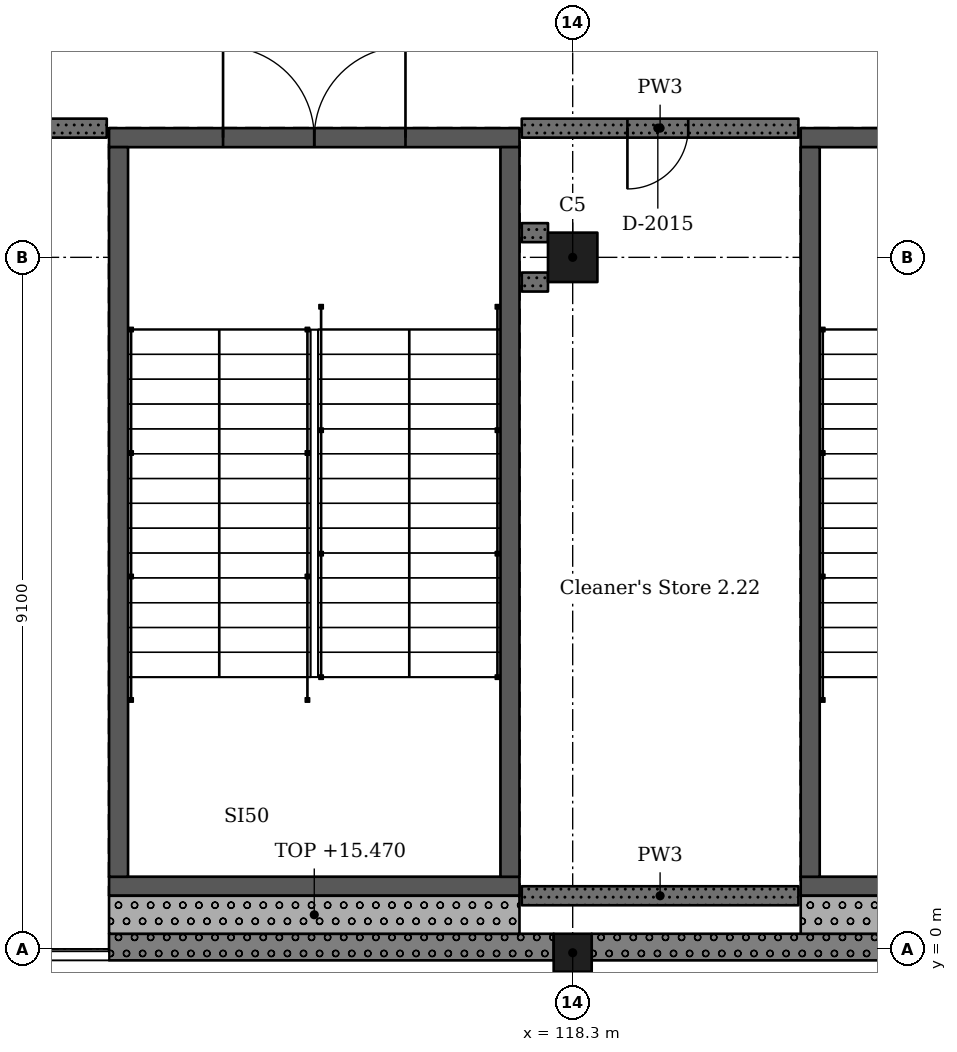
"""IFC4 building model, lengths in metres.
Left out: names, types, materials, properties, quantities, classifications, styles, units other than length and angle.
Written with IfcOpenShell. Run it as: python <this file> out.ifc"""

import sys

from ifc_helpers import new_model, si_unit, direction, frame, frame_2d, origin, origin_2d, place, context, subcontext, project, spatial, rectangle, extrude, element, fill, save


model = new_model("IFC4")
c1 = context("Model", 3, precision=1e-05, world=origin(), true_north=direction((0.0, 1.0)))
c2 = subcontext(c1, "Body", "Model", "MODEL_VIEW")
j1 = project(units=[si_unit("LENGTHUNIT", "METRE"), si_unit("PLANEANGLEUNIT", "RADIAN")], contexts=[c1])
p1 = place(None, origin())
s1 = spatial("IfcSite", under=j1, at=p1, CompositionType="ELEMENT")
p2 = place(p1, origin())
s2 = spatial("IfcBuilding", under=s1, at=p2, CompositionType="ELEMENT")
p3 = place(p2, frame((0.0, 0.0, 10.92)))
s3 = spatial("IfcBuildingStorey", under=s2, at=p3, CompositionType="ELEMENT", Elevation=10.92)
p4 = place(p3, frame((118.3, -0.05, 0.0), z_axis=(0.0, 0.0, 1.0), x_axis=(1.0, 0.0, 0.0)))
e1 = element("IfcColumn", 1, at=p4, inside=s3, PredefinedType="COLUMN", context=c2, shape_type="SweptSolid", body=[
    extrude(rectangle(XDim=0.5, YDim=0.5, at=origin_2d()), origin(), (0.0, 0.0, 1.0), 4.55),
])
p5 = place(p3, frame((118.3, 9.1, 0.0), z_axis=(0.0, 0.0, 1.0), x_axis=(1.0, 0.0, 0.0)))
e2 = element("IfcColumn", 2, at=p5, inside=s3, PredefinedType="COLUMN", context=c2, shape_type="SweptSolid", body=[
    extrude(rectangle(XDim=0.65, YDim=0.65, at=origin_2d()), origin(), (0.0, 0.0, 1.0), 4.55),
])
p6 = place(p3, frame((126.7, 0.825, 0.0), z_axis=(0.0, 0.0, 1.0), x_axis=(-1.0, 0.0, 0.0)))
e3 = element("IfcWall", 3, at=p6, inside=s3, PredefinedType="SHEAR", context=c2, shape_type="SweptSolid", body=[
    extrude(rectangle(XDim=5.4, YDim=0.25, at=frame_2d((2.7, 0.0))), origin(), (0.0, 0.0, 1.0), 4.55),
])
p7 = place(p3, frame((126.7, 10.675, 0.0), z_axis=(0.0, 0.0, 1.0), x_axis=(-1.0, 0.0, 0.0)))
e4 = element("IfcWall", 4, at=p7, inside=s3, PredefinedType="SHEAR", context=c2, shape_type="SweptSolid", body=[
    extrude(rectangle(XDim=5.4, YDim=0.25, at=frame_2d((2.7, 0.0))), origin(), (0.0, 0.0, 1.0), 4.55),
])
p8 = place(p7, frame((1.5, 0.0, 0.0)))
e5 = element("IfcOpeningElement", 5, at=p8, cuts=e4, PredefinedType="OPENING", context=c2, shape_type="SweptSolid", body=[
    extrude(rectangle(XDim=2.4, YDim=2.1, at=frame_2d((1.2, 1.05))), frame((0.0, 0.135, 0.0), z_axis=(0.0, -1.0, 0.0), x_axis=(1.0, 0.0, 0.0)), (0.0, 0.0, 1.0), 0.27),
])
p9 = place(p3, frame((121.425, 10.55, 0.0), z_axis=(0.0, 0.0, 1.0), x_axis=(0.0, -1.0, 0.0)))
e6 = element("IfcWall", 6, at=p9, inside=s3, PredefinedType="SHEAR", context=c2, shape_type="SweptSolid", body=[
    extrude(rectangle(XDim=9.6, YDim=0.25, at=frame_2d((4.8, 0.0))), origin(), (0.0, 0.0, 1.0), 4.55),
])
p10 = place(p3, frame((117.6, 0.825, 0.0), z_axis=(0.0, 0.0, 1.0), x_axis=(-1.0, 0.0, 0.0)))
e7 = element("IfcWall", 7, at=p10, inside=s3, PredefinedType="SHEAR", context=c2, shape_type="SweptSolid", body=[
    extrude(rectangle(XDim=5.4, YDim=0.25, at=frame_2d((2.7, 0.0))), origin(), (0.0, 0.0, 1.0), 4.55),
])
p11 = place(p3, frame((117.6, 10.675, 0.0), z_axis=(0.0, 0.0, 1.0), x_axis=(-1.0, 0.0, 0.0)))
e8 = element("IfcWall", 8, at=p11, inside=s3, PredefinedType="SHEAR", context=c2, shape_type="SweptSolid", body=[
    extrude(rectangle(XDim=5.4, YDim=0.25, at=frame_2d((2.7, 0.0))), origin(), (0.0, 0.0, 1.0), 4.55),
])
p12 = place(p11, frame((1.5, 0.0, 0.0)))
e9 = element("IfcOpeningElement", 9, at=p12, cuts=e8, PredefinedType="OPENING", context=c2, shape_type="SweptSolid", body=[
    extrude(rectangle(XDim=2.4, YDim=2.1, at=frame_2d((1.2, 1.05))), frame((0.0, 0.135, 0.0), z_axis=(0.0, -1.0, 0.0), x_axis=(1.0, 0.0, 0.0)), (0.0, 0.0, 1.0), 0.27),
])
for number, where, z_axis, x_axis in (
    (10, (112.325, 10.55, 0.0), (0.0, 0.0, 1.0), (0.0, -1.0, 0.0)),
    (11, (117.475, 10.55, 0.0), (0.0, 0.0, 1.0), (0.0, -1.0, 0.0)),
):
    element("IfcWall", number, at=place(p3, frame(where, z_axis=z_axis, x_axis=x_axis)), inside=s3, PredefinedType="SHEAR", context=c2, shape_type="SweptSolid", body=[
        extrude(rectangle(XDim=9.6, YDim=0.25, at=frame_2d((4.8, 0.0))), origin(), (0.0, 0.0, 1.0), 4.55),
    ])
p13 = place(p3, frame((112.2, 0.025, 0.0), z_axis=(0.0, 0.0, 1.0), x_axis=(1.0, 0.0, 0.0)))
e12 = element("IfcWall", 12, at=p13, inside=s3, PredefinedType="SOLIDWALL", context=c2, shape_type="SweptSolid", body=[
    extrude(rectangle(XDim=5.85, YDim=0.35, at=frame_2d((2.925, 0.0))), origin(), (0.0, 0.0, 1.0), 3.5),
])
p14 = place(p3, frame((118.55, 0.025, 0.0), z_axis=(0.0, 0.0, 1.0), x_axis=(1.0, 0.0, 0.0)))
e13 = element("IfcWall", 13, at=p14, inside=s3, PredefinedType="SOLIDWALL", context=c2, shape_type="SweptSolid", body=[
    extrude(rectangle(XDim=8.6, YDim=0.35, at=frame_2d((4.3, 0.0))), origin(), (0.0, 0.0, 1.0), 3.5),
])
p15 = place(p3, frame((121.3, 0.45, 0.0), z_axis=(0.0, 0.0, 1.0), x_axis=(1.0, 0.0, 0.0)))
e14 = element("IfcWall", 14, at=p15, inside=s3, PredefinedType="SOLIDWALL", context=c2, shape_type="SweptSolid", body=[
    extrude(rectangle(XDim=5.4, YDim=0.5, at=frame_2d((2.7, 0.0))), origin(), (0.0, 0.0, 1.0), 4.55),
])
p16 = place(p3, frame((112.2, 0.45, 0.0), z_axis=(0.0, 0.0, 1.0), x_axis=(1.0, 0.0, 0.0)))
e15 = element("IfcWall", 15, at=p16, inside=s3, PredefinedType="SOLIDWALL", context=c2, shape_type="SweptSolid", body=[
    extrude(rectangle(XDim=5.4, YDim=0.5, at=frame_2d((2.7, 0.0))), origin(), (0.0, 0.0, 1.0), 4.55),
])
p17 = place(p3, frame((112.17, 10.8, 0.0), z_axis=(0.0, 0.0, 1.0), x_axis=(-1.0, 0.0, 0.0)))
e16 = element("IfcWall", 16, at=p17, inside=s3, PredefinedType="SOLIDWALL", context=c2, shape_type="SweptSolid", body=[
    extrude(rectangle(XDim=2.72, YDim=0.25, at=frame_2d((1.36, 0.0))), origin(), (0.0, 0.0, 1.0), 4.25),
])
for number, where, z_axis, x_axis in (
    (17, (117.63, 8.775, 0.0), (0.0, 0.0, 1.0), (1.0, 0.0, 0.0)),
    (18, (117.975, 9.425, 0.0), (0.0, 0.0, 1.0), (-1.0, 0.0, 0.0)),
):
    element("IfcWall", number, at=place(p3, frame(where, z_axis=z_axis, x_axis=x_axis)), inside=s3, PredefinedType="SOLIDWALL", context=c2, shape_type="SweptSolid", body=[
        extrude(rectangle(XDim=0.345, YDim=0.25, at=frame_2d((0.173, 0.0))), origin(), (0.0, 0.0, 1.0), 4.25),
    ])
p18 = place(p3, frame((121.27, 0.7, 0.0), z_axis=(0.0, 0.0, 1.0), x_axis=(-1.0, 0.0, 0.0)))
e19 = element("IfcWall", 19, at=p18, inside=s3, PredefinedType="SOLIDWALL", context=c2, shape_type="SweptSolid", body=[
    extrude(rectangle(XDim=3.64, YDim=0.25, at=frame_2d((1.82, 0.0))), origin(), (0.0, 0.0, 1.0), 4.25),
])
p19 = place(p3, frame((121.27, 10.8, 0.0), z_axis=(0.0, 0.0, 1.0), x_axis=(-1.0, 0.0, 0.0)))
e20 = element("IfcWall", 20, at=p19, inside=s3, PredefinedType="SOLIDWALL", context=c2, shape_type="SweptSolid", body=[
    extrude(rectangle(XDim=3.64, YDim=0.25, at=frame_2d((1.82, 0.0))), origin(), (0.0, 0.0, 1.0), 4.25),
])
p20 = place(p19, frame((1.45, 0.0, 0.0)))
e21 = element("IfcOpeningElement", 21, at=p20, cuts=e20, PredefinedType="OPENING", context=c2, shape_type="SweptSolid", body=[
    extrude(rectangle(XDim=0.8, YDim=2.1, at=frame_2d((0.4, 1.05))), frame((0.0, 0.135, 0.0), z_axis=(0.0, -1.0, 0.0), x_axis=(1.0, 0.0, 0.0)), (0.0, 0.0, 1.0), 0.27),
])
p21 = place(p20, origin())
e22 = element("IfcDoor", 22, at=p21, inside=s3, OperationType="SINGLE_SWING_LEFT", PredefinedType="DOOR", context=c2, shape_type="SweptSolid", body=[
    extrude(rectangle(XDim=0.8, YDim=2.1, at=frame_2d((0.4, 1.05))), frame((0.0, 0.025, 0.0), z_axis=(0.0, -1.0, 0.0), x_axis=(1.0, 0.0, 0.0)), (0.0, 0.0, 1.0), 0.05),
])
fill(e21, e22)
p22 = place(p12, origin())
e23 = element("IfcDoor", 23, at=p22, inside=s3, OperationType="DOUBLE_DOOR_SINGLE_SWING", PredefinedType="DOOR", context=c2, shape_type="SweptSolid", body=[
    extrude(rectangle(XDim=2.4, YDim=2.1, at=frame_2d((1.2, 1.05))), frame((0.0, 0.025, 0.0), z_axis=(0.0, -1.0, 0.0), x_axis=(1.0, 0.0, 0.0)), (0.0, 0.0, 1.0), 0.05),
])
fill(e9, e23)
save(model, sys.argv[1])
